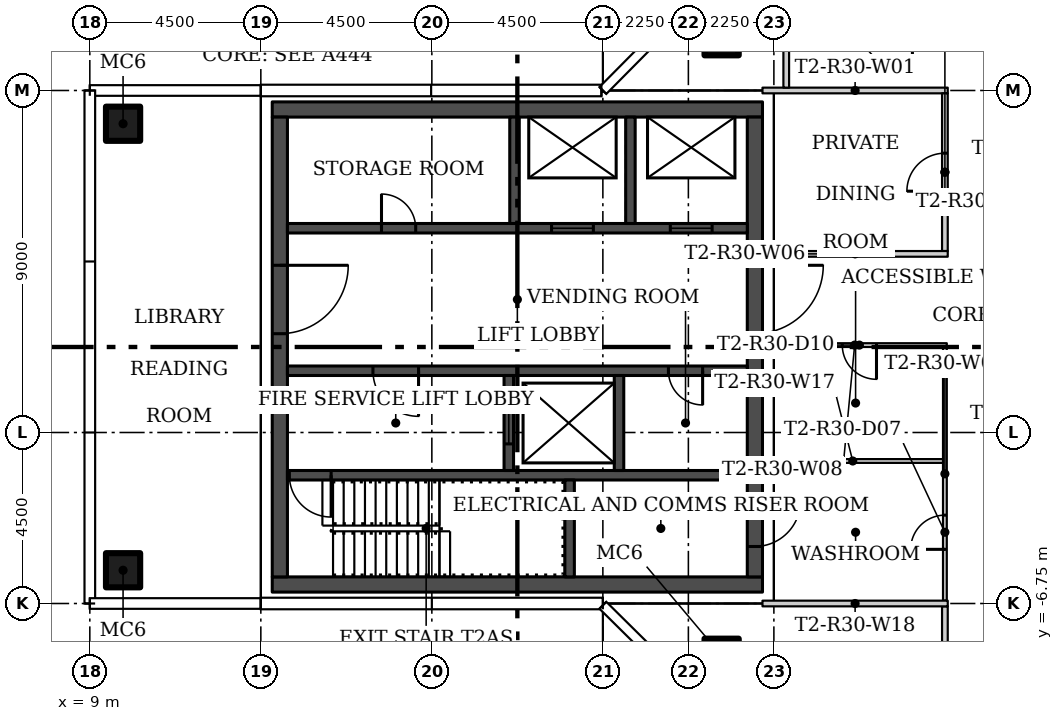
"""IFC4 building model, lengths in metres.
Left out: names, types, materials, properties, quantities, classifications, styles, units other than length and angle.
Written with IfcOpenShell. Run it as: python <this file> out.ifc"""

import sys

from ifc_helpers import new_model, si_unit, direction, frame, frame_2d, origin, origin_2d, place, context, subcontext, project, spatial, rectangle, hollow_rectangle, extrude, element, fill, save


model = new_model("IFC4")
c1 = context("Model", 3, precision=1e-05, world=origin(), true_north=direction((0.0, 1.0)))
c2 = subcontext(c1, "Body", "Model", "MODEL_VIEW")
j1 = project(units=[si_unit("LENGTHUNIT", "METRE"), si_unit("PLANEANGLEUNIT", "RADIAN")], contexts=[c1])
p1 = place(None, origin())
s1 = spatial("IfcSite", under=j1, at=p1, CompositionType="ELEMENT")
p2 = place(p1, origin())
s2 = spatial("IfcBuilding", under=s1, at=p2, CompositionType="ELEMENT")
p3 = place(p2, frame((0.0, 0.0, 269.4)))
s3 = spatial("IfcBuildingStorey", under=s2, at=p3, CompositionType="ELEMENT", Elevation=269.4)
for number, where in (
    (1, (25.625, 8.125, 0.0)),
    (2, (25.625, -8.125, 0.0)),
    (3, (9.875, -5.875, 0.0)),
    (4, (9.875, 5.875, 0.0)),
):
    element("IfcColumn", number, at=place(p3, frame(where)), inside=s3, PredefinedType="COLUMN", context=c2, shape_type="SweptSolid", body=[
        extrude(hollow_rectangle(XDim=0.9, YDim=0.9, WallThickness=0.036, at=origin_2d()), origin(), (0.0, 0.0, 1.0), 3.45),
    ])
p4 = place(p3, frame((31.575, 6.75, 0.0), z_axis=(0.0, 0.0, 1.0), x_axis=(-1.0, 0.0, 0.0)))
e5 = element("IfcWall", 5, at=p4, inside=s3, PredefinedType="PARTITIONING", context=c2, shape_type="SweptSolid", body=[
    extrude(rectangle(XDim=4.875, YDim=0.15, at=frame_2d((2.438, 0.0))), origin(), (0.0, 0.0, 1.0), 3.45),
])
p5 = place(p3, frame((31.5, 2.525, 0.0), z_axis=(0.0, 0.0, 1.0), x_axis=(0.0, 1.0, 0.0)))
e6 = element("IfcWall", 6, at=p5, inside=s3, PredefinedType="PARTITIONING", context=c2, shape_type="SweptSolid", body=[
    extrude(rectangle(XDim=4.15, YDim=0.15, at=frame_2d((2.075, 0.0))), origin(), (0.0, 0.0, 1.0), 3.45),
])
p6 = place(p5, frame((1.575, 0.0, 0.0)))
e7 = element("IfcOpeningElement", 7, at=p6, cuts=e6, PredefinedType="OPENING", context=c2, shape_type="SweptSolid", body=[
    extrude(rectangle(XDim=1.0, YDim=2.4, at=frame_2d((0.5, 1.2))), frame((0.0, 0.085, 0.0), z_axis=(0.0, -1.0, 0.0), x_axis=(1.0, 0.0, 0.0)), (0.0, 0.0, 1.0), 0.17),
])
p7 = place(p3, frame((31.5, -11.175, 0.0), z_axis=(0.0, 0.0, 1.0), x_axis=(0.0, 1.0, 0.0)))
e8 = element("IfcWall", 8, at=p7, inside=s3, PredefinedType="PARTITIONING", context=c2, shape_type="SweptSolid", body=[
    extrude(rectangle(XDim=4.35, YDim=0.15, at=frame_2d((2.175, 0.0))), origin(), (0.0, 0.0, 1.0), 3.45),
])
p8 = place(p7, frame((1.425, 0.0, 0.0)))
e9 = element("IfcOpeningElement", 9, at=p8, cuts=e8, PredefinedType="OPENING", context=c2, shape_type="SweptSolid", body=[
    extrude(rectangle(XDim=1.5, YDim=2.1, at=frame_2d((0.75, 1.05))), frame((0.0, 0.085, 0.0), z_axis=(0.0, -1.0, 0.0), x_axis=(1.0, 0.0, 0.0)), (0.0, 0.0, 1.0), 0.17),
])
p9 = place(p3, frame((26.7, 2.45, 0.0)))
e10 = element("IfcWall", 10, at=p9, inside=s3, PredefinedType="PARTITIONING", context=c2, shape_type="SweptSolid", body=[
    extrude(rectangle(XDim=4.875, YDim=0.15, at=frame_2d((2.438, 0.0))), origin(), (0.0, 0.0, 1.0), 3.45),
])
p10 = place(p3, frame((31.5, -6.675, 0.0), z_axis=(0.0, 0.0, 1.0), x_axis=(0.0, 1.0, 0.0)))
e11 = element("IfcWall", 11, at=p10, inside=s3, PredefinedType="PARTITIONING", context=c2, shape_type="SweptSolid", body=[
    extrude(rectangle(XDim=6.675, YDim=0.1, at=frame_2d((3.337, 0.0))), origin(), (0.0, 0.0, 1.0), 3.45),
])
p11 = place(p10, frame((1.35, 0.0, 0.0)))
e12 = element("IfcOpeningElement", 12, at=p11, cuts=e11, PredefinedType="OPENING", context=c2, shape_type="SweptSolid", body=[
    extrude(rectangle(XDim=0.9, YDim=2.1, at=frame_2d((0.45, 1.05))), frame((0.0, 0.06, 0.0), z_axis=(0.0, -1.0, 0.0), x_axis=(1.0, 0.0, 0.0)), (0.0, 0.0, 1.0), 0.12),
])
p12 = place(p3, frame((31.55, 0.05, 0.0), z_axis=(0.0, 0.0, 1.0), x_axis=(-1.0, 0.0, 0.0)))
e13 = element("IfcWall", 13, at=p12, inside=s3, PredefinedType="PARTITIONING", context=c2, shape_type="SweptSolid", body=[
    extrude(rectangle(XDim=4.85, YDim=0.1, at=frame_2d((2.425, 0.0))), origin(), (0.0, 0.0, 1.0), 3.45),
])
p13 = place(p12, frame((1.85, 0.0, 0.0)))
e14 = element("IfcOpeningElement", 14, at=p13, cuts=e13, PredefinedType="OPENING", context=c2, shape_type="SweptSolid", body=[
    extrude(rectangle(XDim=0.9, YDim=2.1, at=frame_2d((0.45, 1.05))), frame((0.0, 0.06, 0.0), z_axis=(0.0, -1.0, 0.0), x_axis=(1.0, 0.0, 0.0)), (0.0, 0.0, 1.0), 0.12),
])
p14 = place(p3, frame((27.325, 8.675, 0.0), z_axis=(0.0, 0.0, 1.0), x_axis=(0.0, -1.0, 0.0)))
e15 = element("IfcWall", 15, at=p14, inside=s3, PredefinedType="PARTITIONING", context=c2, shape_type="SweptSolid", body=[
    extrude(rectangle(XDim=1.85, YDim=0.15, at=frame_2d((0.925, 0.0))), origin(), (0.0, 0.0, 1.0), 3.45),
])
p15 = place(p3, frame((31.45, -3.0, 0.0), z_axis=(0.0, 0.0, 1.0), x_axis=(-1.0, 0.0, 0.0)))
e16 = element("IfcWall", 16, at=p15, inside=s3, PredefinedType="PARTITIONING", context=c2, shape_type="SweptSolid", body=[
    extrude(rectangle(XDim=4.75, YDim=0.1, at=frame_2d((2.375, 0.0))), origin(), (0.0, 0.0, 1.0), 3.45),
])
p16 = place(p3, frame((26.7, -6.75, 0.0)))
e17 = element("IfcWall", 17, at=p16, inside=s3, PredefinedType="PARTITIONING", context=c2, shape_type="SweptSolid", body=[
    extrude(rectangle(XDim=4.875, YDim=0.15, at=frame_2d((2.438, 0.0))), origin(), (0.0, 0.0, 1.0), 3.45),
])
for number, where in (
    (18, (13.8, -6.25, 0.0)),
    (19, (13.8, 6.25, 0.0)),
):
    element("IfcWall", number, at=place(p3, frame(where)), inside=s3, PredefinedType="SHEAR", context=c2, shape_type="SweptSolid", body=[
        extrude(rectangle(XDim=12.9, YDim=0.4, at=frame_2d((6.45, 0.0))), origin(), (0.0, 0.0, 1.0), 3.45),
    ])
p17 = place(p3, frame((14.0, 6.05, 0.0), z_axis=(0.0, 0.0, 1.0), x_axis=(0.0, -1.0, 0.0)))
e20 = element("IfcWall", 20, at=p17, inside=s3, PredefinedType="SHEAR", context=c2, shape_type="SweptSolid", body=[
    extrude(rectangle(XDim=12.1, YDim=0.4, at=frame_2d((6.05, 0.0))), origin(), (0.0, 0.0, 1.0), 3.45),
])
p18 = place(p17, frame((3.9, 0.0, 0.0)))
e21 = element("IfcOpeningElement", 21, at=p18, cuts=e20, PredefinedType="OPENING", context=c2, shape_type="SweptSolid", body=[
    extrude(rectangle(XDim=1.8, YDim=2.4, at=frame_2d((0.9, 1.2))), frame((0.0, 0.21, 0.0), z_axis=(0.0, -1.0, 0.0), x_axis=(1.0, 0.0, 0.0)), (0.0, 0.0, 1.0), 0.42),
])
p19 = place(p3, frame((26.5, 6.05, 0.0), z_axis=(0.0, 0.0, 1.0), x_axis=(0.0, -1.0, 0.0)))
e22 = element("IfcWall", 22, at=p19, inside=s3, PredefinedType="SHEAR", context=c2, shape_type="SweptSolid", body=[
    extrude(rectangle(XDim=12.1, YDim=0.4, at=frame_2d((6.05, 0.0))), origin(), (0.0, 0.0, 1.0), 3.45),
])
p20 = place(p19, frame((10.1, 0.0, 0.0)))
e23 = element("IfcOpeningElement", 23, at=p20, cuts=e22, PredefinedType="OPENING", context=c2, shape_type="SweptSolid", body=[
    extrude(rectangle(XDim=1.2, YDim=2.1, at=frame_2d((0.6, 1.05))), frame((0.0, 0.21, 0.0), z_axis=(0.0, -1.0, 0.0), x_axis=(1.0, 0.0, 0.0)), (0.0, 0.0, 1.0), 0.42),
])
p21 = place(p19, frame((3.9, 0.0, 0.0)))
e24 = element("IfcOpeningElement", 24, at=p21, cuts=e22, PredefinedType="OPENING", context=c2, shape_type="SweptSolid", body=[
    extrude(rectangle(XDim=1.8, YDim=2.4, at=frame_2d((0.9, 1.2))), frame((0.0, 0.21, 0.0), z_axis=(0.0, -1.0, 0.0), x_axis=(1.0, 0.0, 0.0)), (0.0, 0.0, 1.0), 0.42),
])
p22 = place(p3, frame((26.3, -3.375, 0.0), z_axis=(0.0, 0.0, 1.0), x_axis=(-1.0, 0.0, 0.0)))
e25 = element("IfcWall", 25, at=p22, inside=s3, PredefinedType="SHEAR", context=c2, shape_type="SweptSolid", body=[
    extrude(rectangle(XDim=12.1, YDim=0.25, at=frame_2d((6.05, 0.0))), origin(), (0.0, 0.0, 1.0), 3.45),
])
p23 = place(p22, frame((10.95, 0.0, 0.0)))
e26 = element("IfcOpeningElement", 26, at=p23, cuts=e25, PredefinedType="OPENING", context=c2, shape_type="SweptSolid", body=[
    extrude(rectangle(XDim=1.1, YDim=2.1, at=frame_2d((0.55, 1.05))), frame((0.0, 0.135, 0.0), z_axis=(0.0, -1.0, 0.0), x_axis=(1.0, 0.0, 0.0)), (0.0, 0.0, 1.0), 0.27),
])
p24 = place(p3, frame((21.625, -6.05, 0.0), z_axis=(0.0, 0.0, 1.0), x_axis=(0.0, 1.0, 0.0)))
e27 = element("IfcWall", 27, at=p24, inside=s3, PredefinedType="SHEAR", context=c2, shape_type="SweptSolid", body=[
    extrude(rectangle(XDim=2.55, YDim=0.25, at=frame_2d((1.275, 0.0))), origin(), (0.0, 0.0, 1.0), 3.45),
])
p25 = place(p3, frame((26.3, -0.625, 0.0), z_axis=(0.0, 0.0, 1.0), x_axis=(-1.0, 0.0, 0.0)))
e28 = element("IfcWall", 28, at=p25, inside=s3, PredefinedType="SHEAR", context=c2, shape_type="SweptSolid", body=[
    extrude(rectangle(XDim=12.1, YDim=0.25, at=frame_2d((6.05, 0.0))), origin(), (0.0, 0.0, 1.0), 3.45),
])
p26 = place(p25, frame((8.65, 0.0, 0.0)))
e29 = element("IfcOpeningElement", 29, at=p26, cuts=e28, PredefinedType="OPENING", context=c2, shape_type="SweptSolid", body=[
    extrude(rectangle(XDim=1.2, YDim=2.1, at=frame_2d((0.6, 1.05))), frame((0.0, 0.135, 0.0), z_axis=(0.0, -1.0, 0.0), x_axis=(1.0, 0.0, 0.0)), (0.0, 0.0, 1.0), 0.27),
])
p27 = place(p25, frame((1.175, 0.0, 0.0)))
e30 = element("IfcOpeningElement", 30, at=p27, cuts=e28, PredefinedType="OPENING", context=c2, shape_type="SweptSolid", body=[
    extrude(rectangle(XDim=0.9, YDim=2.1, at=frame_2d((0.45, 1.05))), frame((0.0, 0.135, 0.0), z_axis=(0.0, -1.0, 0.0), x_axis=(1.0, 0.0, 0.0)), (0.0, 0.0, 1.0), 0.27),
])
p28 = place(p3, frame((20.025, -3.25, 0.0), z_axis=(0.0, 0.0, 1.0), x_axis=(0.0, 1.0, 0.0)))
e31 = element("IfcWall", 31, at=p28, inside=s3, PredefinedType="SHEAR", context=c2, shape_type="SweptSolid", body=[
    extrude(rectangle(XDim=2.5, YDim=0.25, at=frame_2d((1.25, 0.0))), origin(), (0.0, 0.0, 1.0), 3.45),
])
p29 = place(p28, frame((0.7, 0.0, 0.0)))
e32 = element("IfcOpeningElement", 32, at=p29, cuts=e31, PredefinedType="OPENING", context=c2, shape_type="SweptSolid", body=[
    extrude(rectangle(XDim=1.1, YDim=2.1, at=frame_2d((0.55, 1.05))), frame((0.0, 0.135, 0.0), z_axis=(0.0, -1.0, 0.0), x_axis=(1.0, 0.0, 0.0)), (0.0, 0.0, 1.0), 0.27),
])
p30 = place(p3, frame((22.925, -3.25, 0.0), z_axis=(0.0, 0.0, 1.0), x_axis=(0.0, 1.0, 0.0)))
e33 = element("IfcWall", 33, at=p30, inside=s3, PredefinedType="SHEAR", context=c2, shape_type="SweptSolid", body=[
    extrude(rectangle(XDim=2.5, YDim=0.25, at=frame_2d((1.25, 0.0))), origin(), (0.0, 0.0, 1.0), 3.45),
])
p31 = place(p3, frame((14.2, 3.125, 0.0)))
e34 = element("IfcWall", 34, at=p31, inside=s3, PredefinedType="SHEAR", context=c2, shape_type="SweptSolid", body=[
    extrude(rectangle(XDim=12.1, YDim=0.25, at=frame_2d((6.05, 0.0))), origin(), (0.0, 0.0, 1.0), 3.45),
])
p32 = place(p31, frame((6.95, 0.0, 0.0)))
e35 = element("IfcOpeningElement", 35, at=p32, cuts=e34, PredefinedType="OPENING", context=c2, shape_type="SweptSolid", body=[
    extrude(rectangle(XDim=1.1, YDim=2.1, at=frame_2d((0.55, 1.05))), frame((0.0, 0.135, 0.0), z_axis=(0.0, -1.0, 0.0), x_axis=(1.0, 0.0, 0.0)), (0.0, 0.0, 1.0), 0.27),
])
p33 = place(p31, frame((10.075, 0.0, 0.0)))
e36 = element("IfcOpeningElement", 36, at=p33, cuts=e34, PredefinedType="OPENING", context=c2, shape_type="SweptSolid", body=[
    extrude(rectangle(XDim=1.1, YDim=2.1, at=frame_2d((0.55, 1.05))), frame((0.0, 0.135, 0.0), z_axis=(0.0, -1.0, 0.0), x_axis=(1.0, 0.0, 0.0)), (0.0, 0.0, 1.0), 0.27),
])
p34 = place(p31, frame((2.475, 0.0, 0.0)))
e37 = element("IfcOpeningElement", 37, at=p34, cuts=e34, PredefinedType="OPENING", context=c2, shape_type="SweptSolid", body=[
    extrude(rectangle(XDim=0.9, YDim=2.1, at=frame_2d((0.45, 1.05))), frame((0.0, 0.135, 0.0), z_axis=(0.0, -1.0, 0.0), x_axis=(1.0, 0.0, 0.0)), (0.0, 0.0, 1.0), 0.27),
])
for number, where, z_axis, x_axis in (
    (38, (20.175, 3.25, 0.0), (0.0, 0.0, 1.0), (0.0, 1.0, 0.0)),
    (39, (23.225, 3.25, 0.0), (0.0, 0.0, 1.0), (0.0, 1.0, 0.0)),
):
    element("IfcWall", number, at=place(p3, frame(where, z_axis=z_axis, x_axis=x_axis)), inside=s3, PredefinedType="SHEAR", context=c2, shape_type="SweptSolid", body=[
        extrude(rectangle(XDim=2.8, YDim=0.25, at=frame_2d((1.4, 0.0))), origin(), (0.0, 0.0, 1.0), 3.45),
    ])
p35 = place(p11, origin())
e40 = element("IfcDoor", 40, at=p35, inside=s3, OperationType="SINGLE_SWING_LEFT", PredefinedType="DOOR", context=c2, shape_type="SweptSolid", body=[
    extrude(rectangle(XDim=0.9, YDim=2.1, at=frame_2d((0.45, 1.05))), frame((0.0, 0.025, 0.0), z_axis=(0.0, -1.0, 0.0), x_axis=(1.0, 0.0, 0.0)), (0.0, 0.0, 1.0), 0.05),
])
fill(e12, e40)
p36 = place(p6, origin())
e41 = element("IfcDoor", 41, at=p36, inside=s3, OperationType="SINGLE_SWING_LEFT", PredefinedType="DOOR", context=c2, shape_type="SweptSolid", body=[
    extrude(rectangle(XDim=1.0, YDim=2.4, at=frame_2d((0.5, 1.2))), frame((0.0, 0.025, 0.0), z_axis=(0.0, -1.0, 0.0), x_axis=(1.0, 0.0, 0.0)), (0.0, 0.0, 1.0), 0.05),
])
fill(e7, e41)
p37 = place(p13, origin())
e42 = element("IfcDoor", 42, at=p37, inside=s3, OperationType="SINGLE_SWING_RIGHT", PredefinedType="DOOR", context=c2, shape_type="SweptSolid", body=[
    extrude(rectangle(XDim=0.9, YDim=2.1, at=frame_2d((0.45, 1.05))), frame((0.0, 0.025, 0.0), z_axis=(0.0, -1.0, 0.0), x_axis=(1.0, 0.0, 0.0)), (0.0, 0.0, 1.0), 0.05),
])
fill(e14, e42)
p38 = place(p18, origin())
e43 = element("IfcDoor", 43, at=p38, inside=s3, OperationType="DOUBLE_DOOR_SINGLE_SWING", PredefinedType="DOOR", context=c2, shape_type="SweptSolid", body=[
    extrude(rectangle(XDim=1.8, YDim=2.4, at=frame_2d((0.9, 1.2))), frame((0.0, 0.025, 0.0), z_axis=(0.0, -1.0, 0.0), x_axis=(1.0, 0.0, 0.0)), (0.0, 0.0, 1.0), 0.05),
])
fill(e21, e43)
p39 = place(p20, origin())
e44 = element("IfcDoor", 44, at=p39, inside=s3, OperationType="SINGLE_SWING_RIGHT", PredefinedType="DOOR", context=c2, shape_type="SweptSolid", body=[
    extrude(rectangle(XDim=1.2, YDim=2.1, at=frame_2d((0.6, 1.05))), frame((0.0, 0.025, 0.0), z_axis=(0.0, -1.0, 0.0), x_axis=(1.0, 0.0, 0.0)), (0.0, 0.0, 1.0), 0.05),
])
fill(e23, e44)
p40 = place(p21, origin())
e45 = element("IfcDoor", 45, at=p40, inside=s3, OperationType="DOUBLE_DOOR_SINGLE_SWING", PredefinedType="DOOR", context=c2, shape_type="SweptSolid", body=[
    extrude(rectangle(XDim=1.8, YDim=2.4, at=frame_2d((0.9, 1.2))), frame((0.0, 0.025, 0.0), z_axis=(0.0, -1.0, 0.0), x_axis=(1.0, 0.0, 0.0)), (0.0, 0.0, 1.0), 0.05),
])
fill(e24, e45)
p41 = place(p23, origin())
e46 = element("IfcDoor", 46, at=p41, inside=s3, OperationType="SINGLE_SWING_RIGHT", PredefinedType="DOOR", context=c2, shape_type="SweptSolid", body=[
    extrude(rectangle(XDim=1.1, YDim=2.1, at=frame_2d((0.55, 1.05))), frame((0.0, 0.025, 0.0), z_axis=(0.0, -1.0, 0.0), x_axis=(1.0, 0.0, 0.0)), (0.0, 0.0, 1.0), 0.05),
])
fill(e26, e46)
p42 = place(p26, origin())
e47 = element("IfcDoor", 47, at=p42, inside=s3, OperationType="SINGLE_SWING_RIGHT", PredefinedType="DOOR", context=c2, shape_type="SweptSolid", body=[
    extrude(rectangle(XDim=1.2, YDim=2.1, at=frame_2d((0.6, 1.05))), frame((0.0, 0.025, 0.0), z_axis=(0.0, -1.0, 0.0), x_axis=(1.0, 0.0, 0.0)), (0.0, 0.0, 1.0), 0.05),
])
fill(e29, e47)
p43 = place(p27, origin())
e48 = element("IfcDoor", 48, at=p43, inside=s3, OperationType="SINGLE_SWING_LEFT", PredefinedType="DOOR", context=c2, shape_type="SweptSolid", body=[
    extrude(rectangle(XDim=0.9, YDim=2.1, at=frame_2d((0.45, 1.05))), frame((0.0, 0.025, 0.0), z_axis=(0.0, -1.0, 0.0), x_axis=(1.0, 0.0, 0.0)), (0.0, 0.0, 1.0), 0.05),
])
fill(e30, e48)
p44 = place(p29, origin())
e49 = element("IfcDoor", 49, at=p44, inside=s3, OperationType="SLIDING_TO_LEFT", PredefinedType="DOOR", context=c2, shape_type="SweptSolid", body=[
    extrude(rectangle(XDim=1.1, YDim=2.1, at=frame_2d((0.55, 1.05))), frame((0.0, 0.025, 0.0), z_axis=(0.0, -1.0, 0.0), x_axis=(1.0, 0.0, 0.0)), (0.0, 0.0, 1.0), 0.05),
])
fill(e32, e49)
p45 = place(p32, origin())
e50 = element("IfcDoor", 50, at=p45, inside=s3, OperationType="SLIDING_TO_LEFT", PredefinedType="DOOR", context=c2, shape_type="SweptSolid", body=[
    extrude(rectangle(XDim=1.1, YDim=2.1, at=frame_2d((0.55, 1.05))), frame((0.0, 0.025, 0.0), z_axis=(0.0, -1.0, 0.0), x_axis=(1.0, 0.0, 0.0)), (0.0, 0.0, 1.0), 0.05),
])
fill(e35, e50)
p46 = place(p33, origin())
e51 = element("IfcDoor", 51, at=p46, inside=s3, OperationType="SLIDING_TO_LEFT", PredefinedType="DOOR", context=c2, shape_type="SweptSolid", body=[
    extrude(rectangle(XDim=1.1, YDim=2.1, at=frame_2d((0.55, 1.05))), frame((0.0, 0.025, 0.0), z_axis=(0.0, -1.0, 0.0), x_axis=(1.0, 0.0, 0.0)), (0.0, 0.0, 1.0), 0.05),
])
fill(e36, e51)
p47 = place(p34, origin())
e52 = element("IfcDoor", 52, at=p47, inside=s3, OperationType="SINGLE_SWING_LEFT", PredefinedType="DOOR", context=c2, shape_type="SweptSolid", body=[
    extrude(rectangle(XDim=0.9, YDim=2.1, at=frame_2d((0.45, 1.05))), frame((0.0, 0.025, 0.0), z_axis=(0.0, -1.0, 0.0), x_axis=(1.0, 0.0, 0.0)), (0.0, 0.0, 1.0), 0.05),
])
fill(e37, e52)
save(model, sys.argv[1])
